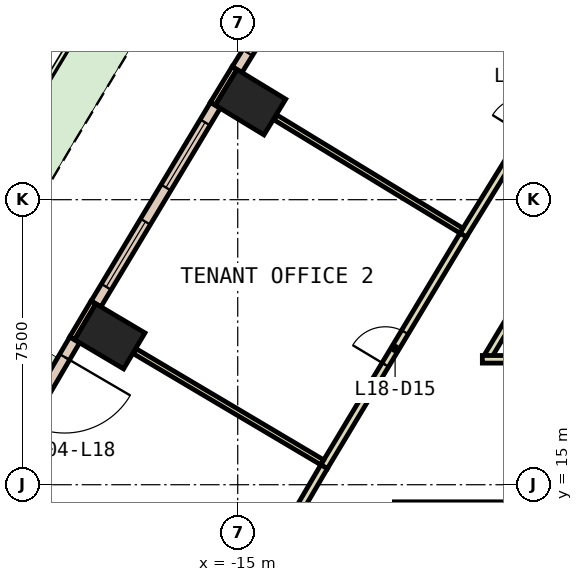
"""IFC4 building model, lengths in metres.
Left out: names, types, materials, properties, quantities, classifications, styles, units other than length and angle.
Written with IfcOpenShell. Run it as: python <this file> out.ifc"""

import sys

from ifc_helpers import new_model, si_unit, direction, frame, frame_2d, origin, origin_2d, place, context, subcontext, project, spatial, rectangle, extrude, element, fill, save


model = new_model("IFC4")
c1 = context("Model", 3, precision=1e-05, world=origin(), true_north=direction((0.0, 1.0)))
c2 = subcontext(c1, "Body", "Model", "MODEL_VIEW")
j1 = project(units=[si_unit("LENGTHUNIT", "METRE"), si_unit("PLANEANGLEUNIT", "RADIAN")], contexts=[c1])
p1 = place(None, origin())
s1 = spatial("IfcSite", under=j1, at=p1, CompositionType="ELEMENT")
p2 = place(p1, origin())
s2 = spatial("IfcBuilding", under=s1, at=p2, CompositionType="ELEMENT")
p3 = place(p2, frame((0.0, 0.0, 86.6)))
s3 = spatial("IfcBuildingStorey", under=s2, at=p3, CompositionType="ELEMENT", Elevation=86.6)
for number, where, z_axis, x_axis in (
    (1, (-14.664, 25.065, 0.0), (0.0, 0.0, 1.0), (0.52, 0.854, 0.0)),
    (2, (-18.367, 18.904, 0.0), (0.0, 0.0, 1.0), (0.51, 0.86, 0.0)),
):
    element("IfcColumn", number, at=place(p3, frame(where, z_axis=z_axis, x_axis=x_axis)), inside=s3, PredefinedType="COLUMN", context=c2, shape_type="SweptSolid", body=[
        extrude(rectangle(XDim=1.1, YDim=1.5, at=origin_2d()), origin(), (0.0, 0.0, 1.0), 3.8),
    ])
p4 = place(p3, frame((-15.083, 25.964, 0.0), z_axis=(0.0, 0.0, 1.0), x_axis=(-0.51977099384, -0.854305632641, 0.0)))
e3 = element("IfcWall", 3, at=p4, inside=s3, PredefinedType="STANDARD", context=c2, shape_type="SweptSolid", body=[
    extrude(rectangle(XDim=1.101, YDim=0.15, at=frame_2d((0.55, 0.0))), origin(), (0.0, 0.0, 1.0), 3.8),
])
p5 = place(p3, frame((-18.796, 19.798, 0.0), z_axis=(0.0, 0.0, 1.0), x_axis=(-0.510082245696, -0.860125631885, 0.0)))
e4 = element("IfcWall", 4, at=p5, inside=s3, PredefinedType="STANDARD", context=c2, shape_type="SweptSolid", body=[
    extrude(rectangle(XDim=1.1, YDim=0.15, at=frame_2d((0.55, 0.0))), origin(), (0.0, 0.0, 1.0), 3.8),
])
p6 = place(p3, frame((-11.814, 31.112, 0.0), z_axis=(0.0, 0.0, 1.0), x_axis=(-0.525204788886, -0.850975869065, 0.0)))
e5 = element("IfcWall", 5, at=p6, inside=s3, PredefinedType="STANDARD", context=c2, shape_type="SweptSolid", body=[
    extrude(rectangle(XDim=6.099, YDim=0.3, at=frame_2d((3.049, 0.0))), origin(), (0.0, 0.0, 1.0), 3.8),
])
p7 = place(p6, frame((0.525, 0.0, 0.0)))
e6 = element("IfcOpeningElement", 6, at=p7, cuts=e5, PredefinedType="OPENING", context=c2, shape_type="SweptSolid", body=[
    extrude(rectangle(XDim=2.0, YDim=2.4, at=frame_2d((1.0, 1.2))), frame((0.0, 0.16, 0.0), z_axis=(0.0, -1.0, 0.0), x_axis=(1.0, 0.0, 0.0)), (0.0, 0.0, 1.0), 0.32),
])
p8 = place(p6, frame((3.574, 0.0, 0.9)))
e7 = element("IfcOpeningElement", 7, at=p8, cuts=e5, PredefinedType="OPENING", context=c2, shape_type="SweptSolid", body=[
    extrude(rectangle(XDim=2.0, YDim=2.6, at=frame_2d((1.0, 1.3))), frame((0.0, 0.16, 0.0), z_axis=(0.0, -1.0, 0.0), x_axis=(1.0, 0.0, 0.0)), (0.0, 0.0, 1.0), 0.32),
])
p9 = place(p3, frame((-15.588, 24.984, 0.0), z_axis=(0.0, 0.0, 1.0), x_axis=(-0.515102053092, -0.857128855483, 0.0)))
e8 = element("IfcWall", 8, at=p9, inside=s3, PredefinedType="STANDARD", context=c2, shape_type="SweptSolid", body=[
    extrude(rectangle(XDim=6.098, YDim=0.3, at=frame_2d((3.049, 0.0))), origin(), (0.0, 0.0, 1.0), 3.8),
])
p10 = place(p9, frame((0.525, 0.0, 0.9)))
e9 = element("IfcOpeningElement", 9, at=p10, cuts=e8, PredefinedType="OPENING", context=c2, shape_type="SweptSolid", body=[
    extrude(rectangle(XDim=2.0, YDim=2.6, at=frame_2d((1.0, 1.3))), frame((0.0, 0.16, 0.0), z_axis=(0.0, -1.0, 0.0), x_axis=(1.0, 0.0, 0.0)), (0.0, 0.0, 1.0), 0.32),
])
p11 = place(p9, frame((3.574, 0.0, 0.9)))
e10 = element("IfcOpeningElement", 10, at=p11, cuts=e8, PredefinedType="OPENING", context=c2, shape_type="SweptSolid", body=[
    extrude(rectangle(XDim=2.0, YDim=2.6, at=frame_2d((1.0, 1.3))), frame((0.0, 0.16, 0.0), z_axis=(0.0, -1.0, 0.0), x_axis=(1.0, 0.0, 0.0)), (0.0, 0.0, 1.0), 0.32),
])
p12 = place(p3, frame((-19.289, 18.813, 0.0), z_axis=(0.0, 0.0, 1.0), x_axis=(-0.504998117261, -0.863120444413, 0.0)))
e11 = element("IfcWall", 11, at=p12, inside=s3, PredefinedType="STANDARD", context=c2, shape_type="SweptSolid", body=[
    extrude(rectangle(XDim=6.099, YDim=0.3, at=frame_2d((3.049, 0.0))), origin(), (0.0, 0.0, 1.0), 3.8),
])
p13 = place(p12, frame((0.525, 0.0, 0.0)))
e12 = element("IfcOpeningElement", 12, at=p13, cuts=e11, PredefinedType="OPENING", context=c2, shape_type="SweptSolid", body=[
    extrude(rectangle(XDim=2.0, YDim=2.4, at=frame_2d((1.0, 1.2))), frame((0.0, 0.16, 0.0), z_axis=(0.0, -1.0, 0.0), x_axis=(1.0, 0.0, 0.0)), (0.0, 0.0, 1.0), 0.32),
])
p14 = place(p12, frame((3.574, 0.0, 0.9)))
e13 = element("IfcOpeningElement", 13, at=p14, cuts=e11, PredefinedType="OPENING", context=c2, shape_type="SweptSolid", body=[
    extrude(rectangle(XDim=2.0, YDim=2.6, at=frame_2d((1.0, 1.3))), frame((0.0, 0.16, 0.0), z_axis=(0.0, -1.0, 0.0), x_axis=(1.0, 0.0, 0.0)), (0.0, 0.0, 1.0), 0.32),
])
p15 = place(p3, frame((-7.148, 20.488, 0.0), z_axis=(0.0, 0.0, 1.0), x_axis=(-0.515008089027, -0.857185317325, 0.0)))
e14 = element("IfcWall", 14, at=p15, inside=s3, PredefinedType="PARTITIONING", context=c2, shape_type="SweptSolid", body=[
    extrude(rectangle(XDim=2.452, YDim=0.2, at=frame_2d((1.226, 0.0))), origin(), (0.0, 0.0, 1.0), 3.8),
])
p16 = place(p3, frame((-9.067, 21.568, 0.0), z_axis=(0.0, 0.0, 1.0), x_axis=(0.525131931126, 0.851020831068, 0.0)))
e15 = element("IfcWall", 15, at=p16, inside=s3, PredefinedType="PARTITIONING", context=c2, shape_type="SweptSolid", body=[
    extrude(rectangle(XDim=7.187, YDim=0.2, at=frame_2d((3.593, 0.0))), origin(), (0.0, 0.0, 1.0), 3.8),
])
p17 = place(p16, frame((3.093, 0.0, 0.0)))
e16 = element("IfcOpeningElement", 16, at=p17, cuts=e15, PredefinedType="OPENING", context=c2, shape_type="SweptSolid", body=[
    extrude(rectangle(XDim=1.0, YDim=2.1, at=frame_2d((0.5, 1.05))), frame((0.0, 0.11, 0.0), z_axis=(0.0, -1.0, 0.0), x_axis=(1.0, 0.0, 0.0)), (0.0, 0.0, 1.0), 0.22),
])
p18 = place(p3, frame((-12.728, 15.473, 0.0), z_axis=(0.0, 0.0, 1.0), x_axis=(0.515010673306, 0.857183764651, 0.0)))
e17 = element("IfcWall", 17, at=p18, inside=s3, PredefinedType="PARTITIONING", context=c2, shape_type="SweptSolid", body=[
    extrude(rectangle(XDim=7.111, YDim=0.2, at=frame_2d((3.555, 0.0))), origin(), (0.0, 0.0, 1.0), 3.8),
])
p19 = place(p18, frame((3.13, 0.0, 0.0)))
e18 = element("IfcOpeningElement", 18, at=p19, cuts=e17, PredefinedType="OPENING", context=c2, shape_type="SweptSolid", body=[
    extrude(rectangle(XDim=1.0, YDim=2.1, at=frame_2d((0.5, 1.05))), frame((0.0, 0.11, 0.0), z_axis=(0.0, -1.0, 0.0), x_axis=(1.0, 0.0, 0.0)), (0.0, 0.0, 1.0), 0.22),
])
p20 = place(p3, frame((-16.281, 9.4, 0.0), z_axis=(0.0, 0.0, 1.0), x_axis=(0.504973069247, 0.863135099121, 0.0)))
e19 = element("IfcWall", 19, at=p20, inside=s3, PredefinedType="PARTITIONING", context=c2, shape_type="SweptSolid", body=[
    extrude(rectangle(XDim=7.036, YDim=0.2, at=frame_2d((3.518, 0.0))), origin(), (0.0, 0.0, 1.0), 3.8),
])
p21 = place(p3, frame((-8.563, 18.3, 0.0), z_axis=(0.0, 0.0, 1.0), x_axis=(1.0, 0.0, 0.0)))
e20 = element("IfcWall", 20, at=p21, inside=s3, PredefinedType="PARTITIONING", context=c2, shape_type="SweptSolid", body=[
    extrude(rectangle(XDim=8.163, YDim=0.2, at=frame_2d((4.082, 0.0))), origin(), (0.0, 0.0, 1.0), 3.8),
])
p22 = place(p21, frame((3.806, 0.0, 0.0)))
e21 = element("IfcOpeningElement", 21, at=p22, cuts=e20, PredefinedType="OPENING", context=c2, shape_type="SweptSolid", body=[
    extrude(rectangle(XDim=1.0, YDim=2.1, at=frame_2d((0.5, 1.05))), frame((0.0, 0.11, 0.0), z_axis=(0.0, -1.0, 0.0), x_axis=(1.0, 0.0, 0.0)), (0.0, 0.0, 1.0), 0.22),
])
p23 = place(p21, frame((4.906, 0.0, 0.0)))
e22 = element("IfcOpeningElement", 22, at=p23, cuts=e20, PredefinedType="OPENING", context=c2, shape_type="SweptSolid", body=[
    extrude(rectangle(XDim=1.0, YDim=2.1, at=frame_2d((0.5, 1.05))), frame((0.0, 0.11, 0.0), z_axis=(0.0, -1.0, 0.0), x_axis=(1.0, 0.0, 0.0)), (0.0, 0.0, 1.0), 0.22),
])
p24 = place(p3, frame((-6.957, 14.45, 0.0), z_axis=(0.0, 0.0, 1.0), x_axis=(-1.0, 0.0, 0.0)))
e23 = element("IfcWall", 23, at=p24, inside=s3, PredefinedType="PARTITIONING", context=c2, shape_type="SweptSolid", body=[
    extrude(rectangle(XDim=3.92, YDim=0.2, at=frame_2d((1.96, 0.0))), origin(), (0.0, 0.0, 1.0), 3.8),
])
p25 = place(p3, frame((-9.113, 21.684, 0.0), z_axis=(0.0, 0.0, 1.0), x_axis=(-0.854075097122, 0.520149717367, 0.0)))
e24 = element("IfcWall", 24, at=p25, inside=s3, PredefinedType="PARTITIONING", context=c2, shape_type="SweptSolid", body=[
    extrude(rectangle(XDim=5.729, YDim=0.15, at=frame_2d((2.865, 0.0))), origin(), (0.0, 0.0, 1.0), 3.8),
])
p26 = place(p3, frame((-12.776, 15.589, 0.0), z_axis=(0.0, 0.0, 1.0), x_axis=(-0.860225086153, 0.509914503768, 0.0)))
e25 = element("IfcWall", 25, at=p26, inside=s3, PredefinedType="PARTITIONING", context=c2, shape_type="SweptSolid", body=[
    extrude(rectangle(XDim=5.73, YDim=0.15, at=frame_2d((2.865, 0.0))), origin(), (0.0, 0.0, 1.0), 3.8),
])
p27 = place(p8, origin())
e26 = element("IfcWindow", 26, at=p27, inside=s3, PartitioningType="SINGLE_PANEL", PredefinedType="WINDOW", context=c2, shape_type="SweptSolid", body=[
    extrude(rectangle(XDim=2.0, YDim=2.6, at=frame_2d((1.0, 1.3))), frame((0.0, 0.03, 0.0), z_axis=(0.0, -1.0, 0.0), x_axis=(1.0, 0.0, 0.0)), (0.0, 0.0, 1.0), 0.06),
])
fill(e7, e26)
p28 = place(p10, origin())
e27 = element("IfcWindow", 27, at=p28, inside=s3, PartitioningType="SINGLE_PANEL", PredefinedType="WINDOW", context=c2, shape_type="SweptSolid", body=[
    extrude(rectangle(XDim=2.0, YDim=2.6, at=frame_2d((1.0, 1.3))), frame((0.0, 0.03, 0.0), z_axis=(0.0, -1.0, 0.0), x_axis=(1.0, 0.0, 0.0)), (0.0, 0.0, 1.0), 0.06),
])
fill(e9, e27)
p29 = place(p11, origin())
e28 = element("IfcWindow", 28, at=p29, inside=s3, PartitioningType="SINGLE_PANEL", PredefinedType="WINDOW", context=c2, shape_type="SweptSolid", body=[
    extrude(rectangle(XDim=2.0, YDim=2.6, at=frame_2d((1.0, 1.3))), frame((0.0, 0.03, 0.0), z_axis=(0.0, -1.0, 0.0), x_axis=(1.0, 0.0, 0.0)), (0.0, 0.0, 1.0), 0.06),
])
fill(e10, e28)
p30 = place(p13, origin())
e29 = element("IfcDoor", 29, at=p30, inside=s3, OperationType="SLIDING_TO_LEFT", PredefinedType="DOOR", context=c2, shape_type="SweptSolid", body=[
    extrude(rectangle(XDim=2.0, YDim=2.4, at=frame_2d((1.0, 1.2))), frame((0.0, 0.025, 0.0), z_axis=(0.0, -1.0, 0.0), x_axis=(1.0, 0.0, 0.0)), (0.0, 0.0, 1.0), 0.05),
])
fill(e12, e29)
p31 = place(p19, origin())
e30 = element("IfcDoor", 30, at=p31, inside=s3, OperationType="SINGLE_SWING_LEFT", PredefinedType="DOOR", context=c2, shape_type="SweptSolid", body=[
    extrude(rectangle(XDim=1.0, YDim=2.1, at=frame_2d((0.5, 1.05))), frame((0.0, 0.025, 0.0), z_axis=(0.0, -1.0, 0.0), x_axis=(1.0, 0.0, 0.0)), (0.0, 0.0, 1.0), 0.05),
])
fill(e18, e30)
save(model, sys.argv[1])
